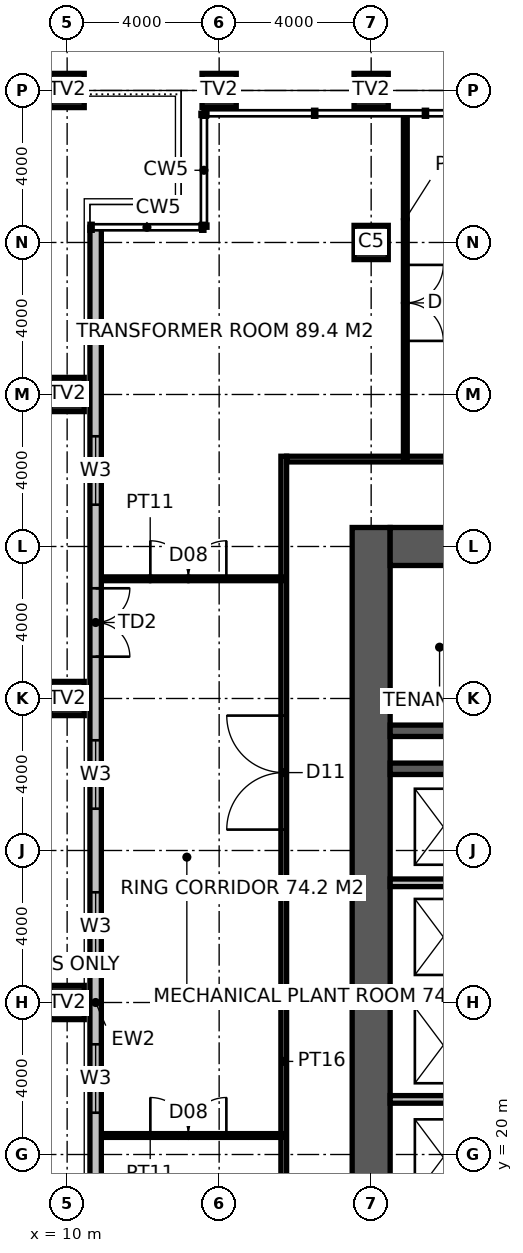
"""IFC4 building model, lengths in metres.
Left out: names, types, materials, properties, quantities, classifications, styles, units other than length and angle.
Written with IfcOpenShell. Run it as: python <this file> out.ifc"""

import sys

from ifc_helpers import new_model, si_unit, direction, frame, frame_2d, origin, origin_2d, place, context, subcontext, project, spatial, rectangle, hollow_rectangle, extrude, element, fill, save


model = new_model("IFC4")
c1 = context("Model", 3, precision=1e-05, world=origin(), true_north=direction((0.0, 1.0)))
c2 = subcontext(c1, "Body", "Model", "MODEL_VIEW")
j1 = project(units=[si_unit("LENGTHUNIT", "METRE"), si_unit("PLANEANGLEUNIT", "RADIAN")], contexts=[c1])
p1 = place(None, origin())
s1 = spatial("IfcSite", under=j1, at=p1, CompositionType="ELEMENT")
p2 = place(p1, origin())
s2 = spatial("IfcBuilding", under=s1, at=p2, CompositionType="ELEMENT")
p3 = place(p2, frame((0.0, 0.0, 71.0)))
s3 = spatial("IfcBuildingStorey", under=s2, at=p3, CompositionType="ELEMENT", Elevation=71.0)
for number, where, z_axis, x_axis in (
    (1, (10.0, 24.0, 0.0), (0.0, 0.0, 1.0), (1.0, 0.0, 0.0)),
    (2, (10.0, 32.0, 0.0), (0.0, 0.0, 1.0), (1.0, 0.0, 0.0)),
    (3, (10.0, 40.0, 0.0), (0.0, 0.0, 1.0), (1.0, 0.0, 0.0)),
    (4, (10.0, 48.0, 0.0), (0.0, 0.0, 1.0), (1.0, 0.0, 0.0)),
    (5, (14.0, 48.0, 0.0), (0.0, 0.0, 1.0), (1.0, 0.0, 0.0)),
    (6, (18.0, 48.0, 0.0), (0.0, 0.0, 1.0), (1.0, 0.0, 0.0)),
):
    element("IfcColumn", number, at=place(p3, frame(where, z_axis=z_axis, x_axis=x_axis)), inside=s3, PredefinedType="USERDEFINED", context=c2, shape_type="SweptSolid", body=[
        extrude(hollow_rectangle(XDim=0.9, YDim=0.9, WallThickness=0.1, at=origin_2d()), origin(), (0.0, 0.0, 1.0), 5.4),
    ])
p4 = place(p3, frame((18.0, 44.0, 0.0), z_axis=(0.0, 0.0, 1.0), x_axis=(1.0, 0.0, 0.0)))
e7 = element("IfcColumn", 7, at=p4, inside=s3, PredefinedType="COLUMN", context=c2, shape_type="SweptSolid", body=[
    extrude(hollow_rectangle(XDim=0.9, YDim=0.9, WallThickness=0.1, at=origin_2d()), origin(), (0.0, 0.0, 1.0), 5.4),
])
p5 = place(p3, frame((18.0, 17.5, -0.15), z_axis=(0.0, 0.0, 1.0), x_axis=(0.0, 1.0, 0.0)))
e8 = element("IfcWall", 8, at=p5, inside=s3, PredefinedType="SHEAR", context=c2, shape_type="SweptSolid", body=[
    extrude(rectangle(XDim=19.0, YDim=1.0, at=frame_2d((9.5, 0.0))), origin(), (0.0, 0.0, 1.0), 5.4),
])
p6 = place(p3, frame((18.5, 36.0, -0.15), z_axis=(0.0, 0.0, 1.0), x_axis=(1.0, 0.0, 0.0)))
e9 = element("IfcWall", 9, at=p6, inside=s3, PredefinedType="SHEAR", context=c2, shape_type="SweptSolid", body=[
    extrude(rectangle(XDim=17.6, YDim=1.0, at=frame_2d((8.8, 0.0))), origin(), (0.0, 0.0, 1.0), 5.4),
])
p7 = place(p3, frame((18.5, 31.15, -0.15), z_axis=(0.0, 0.0, 1.0), x_axis=(1.0, 0.0, 0.0)))
e10 = element("IfcWall", 10, at=p7, inside=s3, PredefinedType="SHEAR", context=c2, shape_type="SweptSolid", body=[
    extrude(rectangle(XDim=5.35, YDim=0.3, at=frame_2d((2.675, 0.0))), origin(), (0.0, 0.0, 1.0), 5.4),
])
p8 = place(p7, frame((3.4, 0.0, 0.15)))
e11 = element("IfcOpeningElement", 11, at=p8, cuts=e10, PredefinedType="OPENING", context=c2, shape_type="SweptSolid", body=[
    extrude(rectangle(XDim=1.0, YDim=2.2, at=frame_2d((0.5, 1.1))), frame((0.0, 0.16, 0.0), z_axis=(0.0, -1.0, 0.0), x_axis=(1.0, 0.0, 0.0)), (0.0, 0.0, 1.0), 0.32),
])
p9 = place(p3, frame((18.5, 30.15, -0.15), z_axis=(0.0, 0.0, 1.0), x_axis=(1.0, 0.0, 0.0)))
e12 = element("IfcWall", 12, at=p9, inside=s3, PredefinedType="SHEAR", context=c2, shape_type="SweptSolid", body=[
    extrude(rectangle(XDim=2.7, YDim=0.3, at=frame_2d((1.35, 0.0))), origin(), (0.0, 0.0, 1.0), 5.4),
])
for number, where, z_axis, x_axis in (
    (13, (18.5, 21.45, 0.0), (0.0, 0.0, 1.0), (1.0, 0.0, 0.0)),
    (14, (18.5, 24.3, 0.0), (0.0, 0.0, 1.0), (1.0, 0.0, 0.0)),
    (15, (18.5, 27.15, 0.0), (0.0, 0.0, 1.0), (1.0, 0.0, 0.0)),
):
    element("IfcWall", number, at=place(p3, frame(where, z_axis=z_axis, x_axis=x_axis)), inside=s3, PredefinedType="SOLIDWALL", context=c2, shape_type="SweptSolid", body=[
        extrude(rectangle(XDim=2.7, YDim=0.2, at=frame_2d((1.35, 0.0))), origin(), (0.0, 0.0, 1.0), 5.25),
    ])
p10 = place(p3, frame((15.7, 15.625, 0.0), z_axis=(0.0, 0.0, 1.0), x_axis=(0.0, 1.0, 0.0)))
e16 = element("IfcWall", 16, at=p10, inside=s3, PredefinedType="PARTITIONING", context=c2, shape_type="SweptSolid", body=[
    extrude(rectangle(XDim=22.75, YDim=0.15, at=frame_2d((11.375, 0.0))), origin(), (0.0, 0.0, 1.0), 5.25),
])
p11 = place(p10, frame((12.925, 0.0, 0.0)))
e17 = element("IfcOpeningElement", 17, at=p11, cuts=e16, PredefinedType="OPENING", context=c2, shape_type="SweptSolid", body=[
    extrude(rectangle(XDim=3.0, YDim=3.3, at=frame_2d((1.5, 1.65))), frame((0.0, 0.085, 0.0), z_axis=(0.0, -1.0, 0.0), x_axis=(1.0, 0.0, 0.0)), (0.0, 0.0, 1.0), 0.17),
])
p12 = place(p3, frame((15.775, 38.3, 0.0), z_axis=(0.0, 0.0, 1.0), x_axis=(1.0, 0.0, 0.0)))
e18 = element("IfcWall", 18, at=p12, inside=s3, PredefinedType="PARTITIONING", context=c2, shape_type="SweptSolid", body=[
    extrude(rectangle(XDim=22.05, YDim=0.15, at=frame_2d((11.025, 0.0))), origin(), (0.0, 0.0, 1.0), 5.25),
])
p13 = place(p12, frame((11.625, 0.0, 0.0)))
e19 = element("IfcOpeningElement", 19, at=p13, cuts=e18, PredefinedType="OPENING", context=c2, shape_type="SweptSolid", body=[
    extrude(rectangle(XDim=1.2, YDim=2.2, at=frame_2d((0.6, 1.1))), frame((0.0, 0.085, 0.0), z_axis=(0.0, -1.0, 0.0), x_axis=(1.0, 0.0, 0.0)), (0.0, 0.0, 1.0), 0.17),
])
p14 = place(p3, frame((10.68, 20.5, 0.0), z_axis=(0.0, 0.0, 1.0), x_axis=(1.0, 0.0, 0.0)))
e20 = element("IfcWall", 20, at=p14, inside=s3, PredefinedType="PARTITIONING", context=c2, shape_type="SweptSolid", body=[
    extrude(rectangle(XDim=5.02, YDim=0.1, at=frame_2d((2.51, 0.0))), origin(), (0.0, 0.0, 1.0), 4.05),
])
p15 = place(p14, frame((1.51, 0.0, 0.0)))
e21 = element("IfcOpeningElement", 21, at=p15, cuts=e20, PredefinedType="OPENING", context=c2, shape_type="SweptSolid", body=[
    extrude(rectangle(XDim=2.0, YDim=2.4, at=frame_2d((1.0, 1.2))), frame((0.0, 0.06, 0.0), z_axis=(0.0, -1.0, 0.0), x_axis=(1.0, 0.0, 0.0)), (0.0, 0.0, 1.0), 0.12),
])
p16 = place(p3, frame((10.68, 35.15, 0.0), z_axis=(0.0, 0.0, 1.0), x_axis=(1.0, 0.0, 0.0)))
e22 = element("IfcWall", 22, at=p16, inside=s3, PredefinedType="PARTITIONING", context=c2, shape_type="SweptSolid", body=[
    extrude(rectangle(XDim=5.02, YDim=0.1, at=frame_2d((2.51, 0.0))), origin(), (0.0, 0.0, 1.0), 5.25),
])
p17 = place(p16, frame((1.51, 0.0, 0.0)))
e23 = element("IfcOpeningElement", 23, at=p17, cuts=e22, PredefinedType="OPENING", context=c2, shape_type="SweptSolid", body=[
    extrude(rectangle(XDim=2.0, YDim=2.4, at=frame_2d((1.0, 1.2))), frame((0.0, 0.06, 0.0), z_axis=(0.0, -1.0, 0.0), x_axis=(1.0, 0.0, 0.0)), (0.0, 0.0, 1.0), 0.12),
])
p18 = place(p3, frame((18.899, 47.32, 0.0), z_axis=(0.0, 0.0, 1.0), x_axis=(0.0, -1.0, 0.0)))
e24 = element("IfcWall", 24, at=p18, inside=s3, PredefinedType="PARTITIONING", context=c2, shape_type="SweptSolid", body=[
    extrude(rectangle(XDim=9.02, YDim=0.1, at=frame_2d((4.51, 0.0))), origin(), (0.0, 0.0, 1.0), 5.25),
])
p19 = place(p18, frame((3.91, 0.0, 0.0)))
e25 = element("IfcOpeningElement", 25, at=p19, cuts=e24, PredefinedType="OPENING", context=c2, shape_type="SweptSolid", body=[
    extrude(rectangle(XDim=2.0, YDim=2.4, at=frame_2d((1.0, 1.2))), frame((0.0, 0.06, 0.0), z_axis=(0.0, -1.0, 0.0), x_axis=(1.0, 0.0, 0.0)), (0.0, 0.0, 1.0), 0.12),
])
p20 = place(p3, frame((10.75, 44.4, 0.0), z_axis=(0.0, 0.0, 1.0), x_axis=(0.0, -1.0, 0.0)))
e26 = element("IfcWall", 26, at=p20, inside=s3, PredefinedType="ELEMENTEDWALL", context=c2, shape_type="SweptSolid", body=[
    extrude(rectangle(XDim=40.8, YDim=0.3, at=frame_2d((20.4, 0.0))), origin(), (0.0, 0.0, 1.0), 5.25),
])
p21 = place(p20, frame((33.5, 0.0, 0.8)))
e27 = element("IfcOpeningElement", 27, at=p21, cuts=e26, PredefinedType="OPENING", context=c2, shape_type="SweptSolid", body=[
    extrude(rectangle(XDim=1.8, YDim=2.4, at=frame_2d((0.9, 1.2))), frame((0.0, 0.16, 0.0), z_axis=(0.0, -1.0, 0.0), x_axis=(1.0, 0.0, 0.0)), (0.0, 0.0, 1.0), 0.32),
])
p22 = place(p20, frame((29.5, 0.0, 0.0)))
e28 = element("IfcOpeningElement", 28, at=p22, cuts=e26, PredefinedType="OPENING", context=c2, shape_type="SweptSolid", body=[
    extrude(rectangle(XDim=1.8, YDim=2.4, at=frame_2d((0.9, 1.2))), frame((0.0, 0.16, 0.0), z_axis=(0.0, -1.0, 0.0), x_axis=(1.0, 0.0, 0.0)), (0.0, 0.0, 1.0), 0.32),
])
p23 = place(p20, frame((25.5, 0.0, 0.8)))
e29 = element("IfcOpeningElement", 29, at=p23, cuts=e26, PredefinedType="OPENING", context=c2, shape_type="SweptSolid", body=[
    extrude(rectangle(XDim=1.8, YDim=2.4, at=frame_2d((0.9, 1.2))), frame((0.0, 0.16, 0.0), z_axis=(0.0, -1.0, 0.0), x_axis=(1.0, 0.0, 0.0)), (0.0, 0.0, 1.0), 0.32),
])
p24 = place(p20, frame((21.5, 0.0, 0.8)))
e30 = element("IfcOpeningElement", 30, at=p24, cuts=e26, PredefinedType="OPENING", context=c2, shape_type="SweptSolid", body=[
    extrude(rectangle(XDim=1.8, YDim=2.4, at=frame_2d((0.9, 1.2))), frame((0.0, 0.16, 0.0), z_axis=(0.0, -1.0, 0.0), x_axis=(1.0, 0.0, 0.0)), (0.0, 0.0, 1.0), 0.32),
])
p25 = place(p20, frame((17.5, 0.0, 0.8)))
e31 = element("IfcOpeningElement", 31, at=p25, cuts=e26, PredefinedType="OPENING", context=c2, shape_type="SweptSolid", body=[
    extrude(rectangle(XDim=1.8, YDim=2.4, at=frame_2d((0.9, 1.2))), frame((0.0, 0.16, 0.0), z_axis=(0.0, -1.0, 0.0), x_axis=(1.0, 0.0, 0.0)), (0.0, 0.0, 1.0), 0.32),
])
p26 = place(p20, frame((13.5, 0.0, 0.8)))
e32 = element("IfcOpeningElement", 32, at=p26, cuts=e26, PredefinedType="OPENING", context=c2, shape_type="SweptSolid", body=[
    extrude(rectangle(XDim=1.8, YDim=2.4, at=frame_2d((0.9, 1.2))), frame((0.0, 0.16, 0.0), z_axis=(0.0, -1.0, 0.0), x_axis=(1.0, 0.0, 0.0)), (0.0, 0.0, 1.0), 0.32),
])
p27 = place(p20, frame((9.5, 0.0, 0.0)))
e33 = element("IfcOpeningElement", 33, at=p27, cuts=e26, PredefinedType="OPENING", context=c2, shape_type="SweptSolid", body=[
    extrude(rectangle(XDim=1.8, YDim=2.4, at=frame_2d((0.9, 1.2))), frame((0.0, 0.16, 0.0), z_axis=(0.0, -1.0, 0.0), x_axis=(1.0, 0.0, 0.0)), (0.0, 0.0, 1.0), 0.32),
])
p28 = place(p20, frame((5.5, 0.0, 0.8)))
e34 = element("IfcOpeningElement", 34, at=p28, cuts=e26, PredefinedType="OPENING", context=c2, shape_type="SweptSolid", body=[
    extrude(rectangle(XDim=1.8, YDim=2.4, at=frame_2d((0.9, 1.2))), frame((0.0, 0.16, 0.0), z_axis=(0.0, -1.0, 0.0), x_axis=(1.0, 0.0, 0.0)), (0.0, 0.0, 1.0), 0.32),
])
p29 = place(p11, origin())
e35 = element("IfcDoor", 35, at=p29, inside=s3, OperationType="DOUBLE_DOOR_DOUBLE_SWING", PredefinedType="DOOR", context=c2, shape_type="SweptSolid", body=[
    extrude(rectangle(XDim=3.0, YDim=3.3, at=frame_2d((1.5, 1.65))), frame((0.0, 0.025, 0.0), z_axis=(0.0, -1.0, 0.0), x_axis=(1.0, 0.0, 0.0)), (0.0, 0.0, 1.0), 0.05),
])
fill(e17, e35)
p30 = place(p15, origin())
e36 = element("IfcDoor", 36, at=p30, inside=s3, OperationType="DOUBLE_DOOR_DOUBLE_SWING", PredefinedType="DOOR", context=c2, shape_type="SweptSolid", body=[
    extrude(rectangle(XDim=2.0, YDim=2.4, at=frame_2d((1.0, 1.2))), frame((0.0, 0.025, 0.0), z_axis=(0.0, -1.0, 0.0), x_axis=(1.0, 0.0, 0.0)), (0.0, 0.0, 1.0), 0.05),
])
fill(e21, e36)
p31 = place(p17, origin())
e37 = element("IfcDoor", 37, at=p31, inside=s3, OperationType="DOUBLE_DOOR_DOUBLE_SWING", PredefinedType="DOOR", context=c2, shape_type="SweptSolid", body=[
    extrude(rectangle(XDim=2.0, YDim=2.4, at=frame_2d((1.0, 1.2))), frame((0.0, 0.025, 0.0), z_axis=(0.0, -1.0, 0.0), x_axis=(1.0, 0.0, 0.0)), (0.0, 0.0, 1.0), 0.05),
])
fill(e23, e37)
p32 = place(p19, origin())
e38 = element("IfcDoor", 38, at=p32, inside=s3, OperationType="DOUBLE_DOOR_DOUBLE_SWING", PredefinedType="DOOR", context=c2, shape_type="SweptSolid", body=[
    extrude(rectangle(XDim=2.0, YDim=2.4, at=frame_2d((1.0, 1.2))), frame((0.0, 0.025, 0.0), z_axis=(0.0, -1.0, 0.0), x_axis=(1.0, 0.0, 0.0)), (0.0, 0.0, 1.0), 0.05),
])
fill(e25, e38)
p33 = place(p24, origin())
e39 = element("IfcWindow", 39, at=p33, inside=s3, PartitioningType="SINGLE_PANEL", PredefinedType="WINDOW", context=c2, shape_type="SweptSolid", body=[
    extrude(rectangle(XDim=1.8, YDim=2.4, at=frame_2d((0.9, 1.2))), frame((0.0, 0.03, 0.0), z_axis=(0.0, -1.0, 0.0), x_axis=(1.0, 0.0, 0.0)), (0.0, 0.0, 1.0), 0.06),
])
fill(e30, e39)
p34 = place(p25, origin())
e40 = element("IfcWindow", 40, at=p34, inside=s3, PartitioningType="SINGLE_PANEL", PredefinedType="WINDOW", context=c2, shape_type="SweptSolid", body=[
    extrude(rectangle(XDim=1.8, YDim=2.4, at=frame_2d((0.9, 1.2))), frame((0.0, 0.03, 0.0), z_axis=(0.0, -1.0, 0.0), x_axis=(1.0, 0.0, 0.0)), (0.0, 0.0, 1.0), 0.06),
])
fill(e31, e40)
p35 = place(p26, origin())
e41 = element("IfcWindow", 41, at=p35, inside=s3, PartitioningType="SINGLE_PANEL", PredefinedType="WINDOW", context=c2, shape_type="SweptSolid", body=[
    extrude(rectangle(XDim=1.8, YDim=2.4, at=frame_2d((0.9, 1.2))), frame((0.0, 0.03, 0.0), z_axis=(0.0, -1.0, 0.0), x_axis=(1.0, 0.0, 0.0)), (0.0, 0.0, 1.0), 0.06),
])
fill(e32, e41)
p36 = place(p27, origin())
e42 = element("IfcDoor", 42, at=p36, inside=s3, OperationType="DOUBLE_DOOR_SINGLE_SWING", PredefinedType="DOOR", context=c2, shape_type="SweptSolid", body=[
    extrude(rectangle(XDim=1.8, YDim=2.4, at=frame_2d((0.9, 1.2))), frame((0.0, 0.025, 0.0), z_axis=(0.0, -1.0, 0.0), x_axis=(1.0, 0.0, 0.0)), (0.0, 0.0, 1.0), 0.05),
])
fill(e33, e42)
p37 = place(p28, origin())
e43 = element("IfcWindow", 43, at=p37, inside=s3, PartitioningType="SINGLE_PANEL", PredefinedType="WINDOW", context=c2, shape_type="SweptSolid", body=[
    extrude(rectangle(XDim=1.8, YDim=2.4, at=frame_2d((0.9, 1.2))), frame((0.0, 0.03, 0.0), z_axis=(0.0, -1.0, 0.0), x_axis=(1.0, 0.0, 0.0)), (0.0, 0.0, 1.0), 0.06),
])
fill(e34, e43)
save(model, sys.argv[1])
